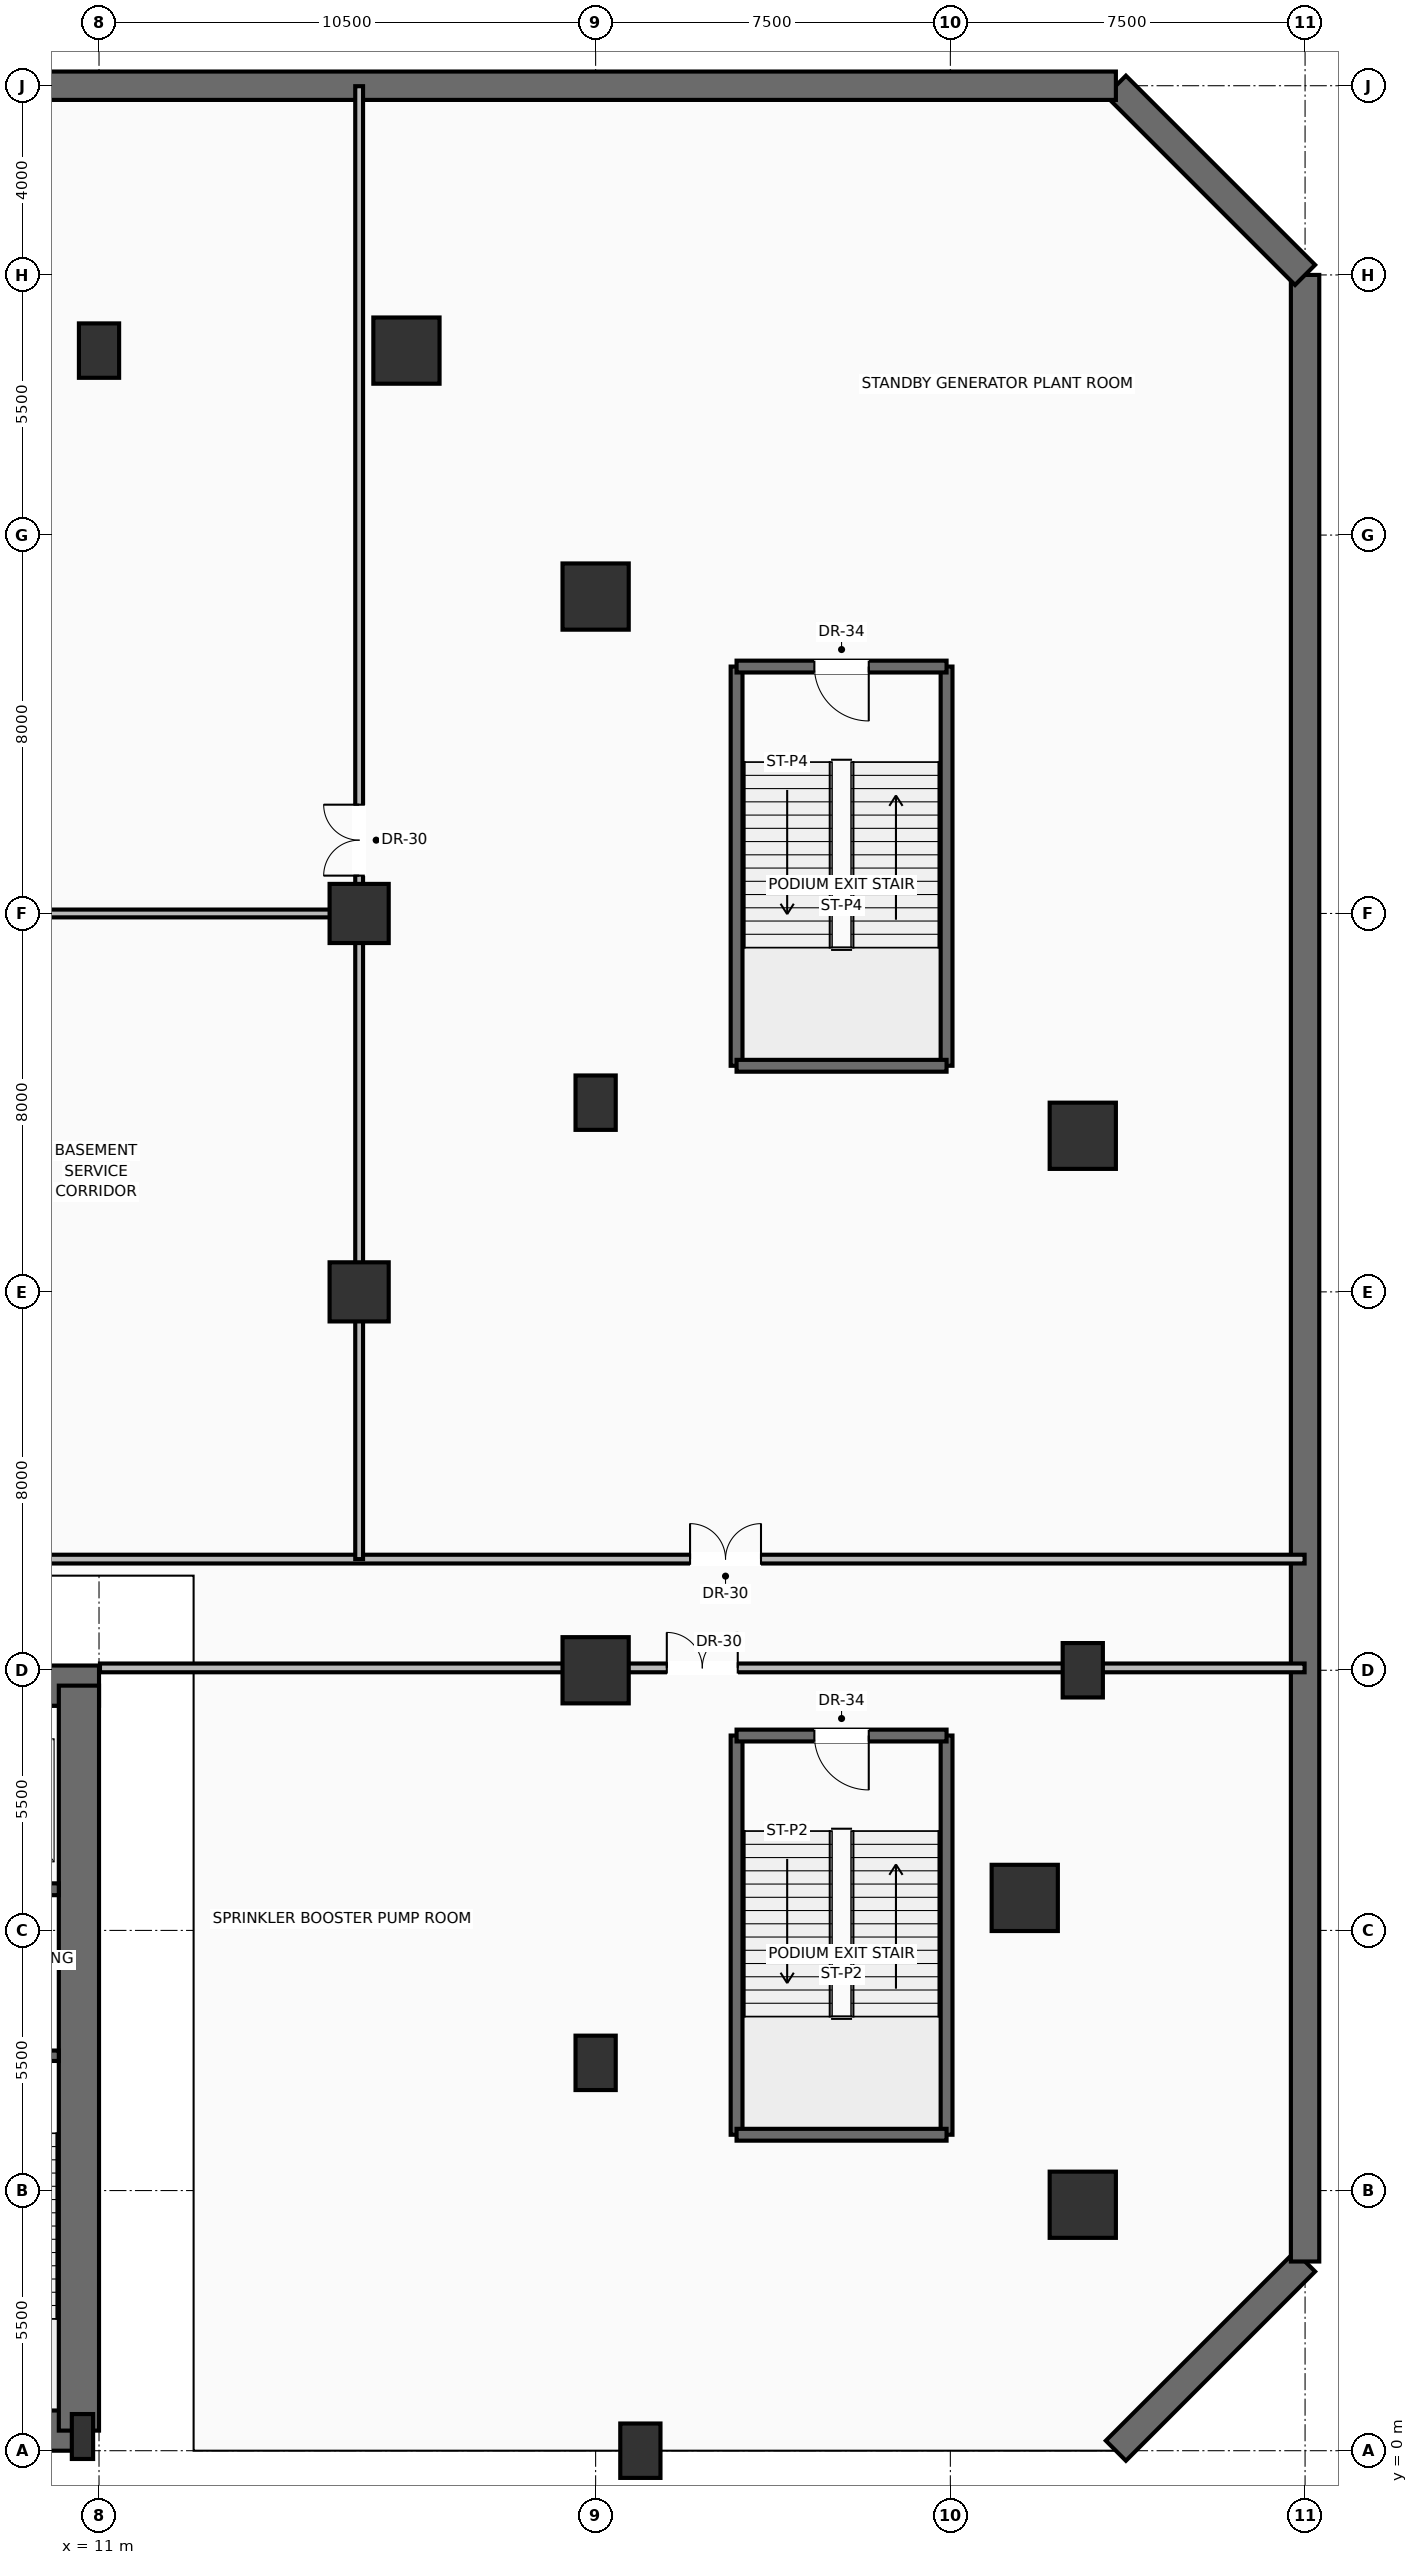
"""IFC4 building model, lengths in metres.
Left out: names, types, materials, properties, quantities, classifications, styles, units other than length and angle.
Written with IfcOpenShell. Run it as: python <this file> out.ifc"""

import sys

from ifc_helpers import new_model, si_unit, direction, frame, frame_2d, origin, origin_2d, place, context, subcontext, project, spatial, rectangle, hollow_rectangle, extrude, source, transform, mapped, element, fill, save


model = new_model("IFC4")
c1 = context("Model", 3, precision=1e-05, world=origin(), true_north=direction((0.0, 1.0)))
c2 = subcontext(c1, "Body", "Model", "MODEL_VIEW")
j1 = project(units=[si_unit("LENGTHUNIT", "METRE"), si_unit("PLANEANGLEUNIT", "RADIAN")], contexts=[c1])
p1 = place(None, origin())
s1 = spatial("IfcSite", under=j1, at=p1, CompositionType="ELEMENT")
p2 = place(p1, origin())
s2 = spatial("IfcBuilding", under=s1, at=p2, CompositionType="ELEMENT")
p3 = place(p2, frame((0.0, 0.0, -10.0)))
s3 = spatial("IfcBuildingStorey", under=s2, at=p3, CompositionType="ELEMENT", Elevation=-10.0)
p4 = place(p3, frame((32.5, 0.0, 0.0), z_axis=(0.0, 0.0, 1.0), x_axis=(0.707106781187, 0.707106781187, 0.0)))
e1 = element("IfcWall", 1, at=p4, inside=s3, PredefinedType="SOLIDWALL", context=c2, shape_type="SweptSolid", body=[
    extrude(rectangle(XDim=5.657, YDim=0.6, at=frame_2d((2.828, 0.0))), origin(), (0.0, 0.0, 1.0), 4.6),
])
p5 = place(p3, frame((36.5, 4.0, 0.0), z_axis=(0.0, 0.0, 1.0), x_axis=(0.0, 1.0, 0.0)))
e2 = element("IfcWall", 2, at=p5, inside=s3, PredefinedType="SOLIDWALL", context=c2, shape_type="SweptSolid", body=[
    extrude(rectangle(XDim=42.0, YDim=0.6, at=frame_2d((21.0, 0.0))), origin(), (0.0, 0.0, 1.0), 4.6),
])
p6 = place(p3, frame((36.5, 46.0, 0.0), z_axis=(0.0, 0.0, 1.0), x_axis=(-0.707106781187, 0.707106781187, 0.0)))
e3 = element("IfcWall", 3, at=p6, inside=s3, PredefinedType="SOLIDWALL", context=c2, shape_type="SweptSolid", body=[
    extrude(rectangle(XDim=5.657, YDim=0.6, at=frame_2d((2.828, 0.0))), origin(), (0.0, 0.0, 1.0), 4.6),
])
p7 = place(p3, frame((32.5, 50.0, 0.0), z_axis=(0.0, 0.0, 1.0), x_axis=(-1.0, 0.0, 0.0)))
e4 = element("IfcWall", 4, at=p7, inside=s3, PredefinedType="SOLIDWALL", context=c2, shape_type="SweptSolid", body=[
    extrude(rectangle(XDim=65.0, YDim=0.6, at=frame_2d((32.5, 0.0))), origin(), (0.0, 0.0, 1.0), 4.6),
])
p8 = place(p3, frame((-10.65, 0.425, 0.0), z_axis=(0.0, 0.0, 1.0), x_axis=(1.0, 0.0, 0.0)))
e5 = element("IfcWall", 5, at=p8, inside=s3, PredefinedType="SHEAR", context=c2, shape_type="SweptSolid", body=[
    extrude(rectangle(XDim=21.3, YDim=0.85, at=frame_2d((10.65, 0.0))), origin(), (0.0, 0.0, 1.0), 4.6),
])
p9 = place(p3, frame((-11.0, 16.175, 0.0), z_axis=(0.0, 0.0, 1.0), x_axis=(1.0, 0.0, 0.0)))
e6 = element("IfcWall", 6, at=p9, inside=s3, PredefinedType="SHEAR", context=c2, shape_type="SweptSolid", body=[
    extrude(rectangle(XDim=22.0, YDim=0.85, at=frame_2d((11.0, 0.0))), origin(), (0.0, 0.0, 1.0), 4.6),
])
p10 = place(p9, frame((3.57, 0.0, 0.0)))
e7 = element("IfcOpeningElement", 7, at=p10, cuts=e6, PredefinedType="OPENING", context=c2, shape_type="SweptSolid", body=[
    extrude(rectangle(XDim=1.3, YDim=2.3, at=frame_2d((0.65, 1.15))), frame((0.0, 0.435, 0.0), z_axis=(0.0, -1.0, 0.0), x_axis=(1.0, 0.0, 0.0)), (0.0, 0.0, 1.0), 0.87),
])
p11 = place(p9, frame((10.0, 0.0, 0.0)))
e8 = element("IfcOpeningElement", 8, at=p11, cuts=e6, PredefinedType="OPENING", context=c2, shape_type="SweptSolid", body=[
    extrude(rectangle(XDim=2.0, YDim=2.4, at=frame_2d((1.0, 1.2))), frame((0.0, 0.435, 0.0), z_axis=(0.0, -1.0, 0.0), x_axis=(1.0, 0.0, 0.0)), (0.0, 0.0, 1.0), 0.87),
])
p12 = place(p3, frame((10.575, 0.425, 0.0), z_axis=(0.0, 0.0, 1.0), x_axis=(0.0, 1.0, 0.0)))
e9 = element("IfcWall", 9, at=p12, inside=s3, PredefinedType="SHEAR", context=c2, shape_type="SweptSolid", body=[
    extrude(rectangle(XDim=15.75, YDim=0.85, at=frame_2d((7.875, 0.0))), origin(), (0.0, 0.0, 1.0), 4.6),
])
m1 = source(origin(), c2, "Body", "SweptSolid", [
    extrude(rectangle(XDim=0.45, YDim=0.95, at=origin_2d()), origin(), (0.0, 0.0, 1.0), 5.0),
])
p13 = place(p3, frame((10.65, 0.3, 0.0), z_axis=(0.0, 0.0, 1.0), x_axis=(1.0, 0.0, 0.0)))
e10 = element("IfcColumn", 10, at=p13, inside=s3, PredefinedType="PILASTER", context=c2, shape_type="MappedRepresentation", body=[
    mapped(m1, transform((0.0, 0.0, 0.0), scale=1.0)),
])
m2 = source(origin(), c2, "Body", "SweptSolid", [
    extrude(rectangle(XDim=0.85, YDim=1.15, at=origin_2d()), origin(), (0.0, 0.0, 1.0), 5.0),
])
for number, where, z_axis, x_axis in (
    (11, (22.446, 0.0, 0.0), (0.0, 0.0, 1.0), (1.0, 0.0, 0.0)),
    (12, (21.5, 8.2, 0.0), (0.0, 0.0, 1.0), (1.0, 0.0, 0.0)),
    (13, (31.8, 16.5, 0.0), (0.0, 0.0, 1.0), (1.0, 0.0, 0.0)),
    (14, (21.5, 28.5, 0.0), (0.0, 0.0, 1.0), (1.0, 0.0, 0.0)),
    (15, (11.0, 44.4, 0.0), (0.0, 0.0, 1.0), (1.0, 0.0, 0.0)),
):
    element("IfcColumn", number, at=place(p3, frame(where, z_axis=z_axis, x_axis=x_axis)), inside=s3, PredefinedType="COLUMN", context=c2, shape_type="MappedRepresentation", body=[
        mapped(m2, transform((0.0, 0.0, 0.0), scale=1.0)),
    ])
m3 = source(origin(), c2, "Body", "SweptSolid", [
    extrude(hollow_rectangle(XDim=1.4, YDim=1.4, WallThickness=0.07, at=origin_2d()), origin(), (0.0, 0.0, 1.0), 5.0),
])
for number, where, z_axis, x_axis in (
    (16, (21.5, 39.2, 0.0), (0.0, 0.0, 1.0), (1.0, 0.0, 0.0)),
    (17, (21.5, 16.5, 0.0), (0.0, 0.0, 1.0), (1.0, 0.0, 0.0)),
    (18, (31.8, 5.2, 0.0), (0.0, 0.0, 1.0), (1.0, 0.0, 0.0)),
    (19, (31.8, 27.8, 0.0), (0.0, 0.0, 1.0), (1.0, 0.0, 0.0)),
    (20, (17.5, 44.4, 0.0), (0.0, 0.0, 1.0), (1.0, 0.0, 0.0)),
    (21, (30.573, 11.687, 0.0), (0.0, 0.0, 1.0), (1.0, 0.0, 0.0)),
):
    element("IfcColumn", number, at=place(p3, frame(where, z_axis=z_axis, x_axis=x_axis)), inside=s3, PredefinedType="COLUMN", context=c2, shape_type="MappedRepresentation", body=[
        mapped(m3, transform((0.0, 0.0, 0.0), scale=1.0)),
    ])
m4 = source(origin(), c2, "Body", "SweptSolid", [
    extrude(rectangle(XDim=1.25, YDim=1.25, at=origin_2d()), origin(), (0.0, 0.0, 1.0), 5.0),
])
for number, where, z_axis, x_axis in (
    (22, (16.5, 24.5, 0.0), (0.0, 0.0, 1.0), (1.0, 0.0, 0.0)),
    (23, (16.5, 32.5, 0.0), (0.0, 0.0, 1.0), (1.0, 0.0, 0.0)),
):
    element("IfcColumn", number, at=place(p3, frame(where, z_axis=z_axis, x_axis=x_axis)), inside=s3, PredefinedType="COLUMN", context=c2, shape_type="MappedRepresentation", body=[
        mapped(m4, transform((0.0, 0.0, 0.0), scale=1.0)),
    ])
p14 = place(p3, frame((10.15, 8.35, 0.0), z_axis=(0.0, 0.0, 1.0), x_axis=(-1.0, 0.0, 0.0)))
e24 = element("IfcWall", 24, at=p14, inside=s3, PredefinedType="SOLIDWALL", context=c2, shape_type="SweptSolid", body=[
    extrude(rectangle(XDim=4.65, YDim=0.22, at=frame_2d((2.325, 0.0))), origin(), (0.0, 0.0, 1.0), 4.6),
])
p15 = place(p14, frame((1.0, 0.0, 0.0)))
e25 = element("IfcOpeningElement", 25, at=p15, cuts=e24, PredefinedType="OPENING", context=c2, shape_type="SweptSolid", body=[
    extrude(rectangle(XDim=1.15, YDim=2.2, at=frame_2d((0.575, 1.1))), frame((0.0, 0.12, 0.0), z_axis=(0.0, -1.0, 0.0), x_axis=(1.0, 0.0, 0.0)), (0.0, 0.0, 1.0), 0.24),
])
p16 = place(p3, frame((10.15, 11.87, 0.0), z_axis=(0.0, 0.0, 1.0), x_axis=(-1.0, 0.0, 0.0)))
e26 = element("IfcWall", 26, at=p16, inside=s3, PredefinedType="SOLIDWALL", context=c2, shape_type="SweptSolid", body=[
    extrude(rectangle(XDim=4.65, YDim=0.25, at=frame_2d((2.325, 0.0))), origin(), (0.0, 0.0, 1.0), 4.6),
])
p17 = place(p16, frame((0.5, 0.0, 0.0)))
e27 = element("IfcOpeningElement", 27, at=p17, cuts=e26, PredefinedType="OPENING", context=c2, shape_type="SweptSolid", body=[
    extrude(rectangle(XDim=1.2, YDim=2.25, at=frame_2d((0.6, 1.125))), frame((0.0, 0.135, 0.0), z_axis=(0.0, -1.0, 0.0), x_axis=(1.0, 0.0, 0.0)), (0.0, 0.0, 1.0), 0.27),
])
for number, where, z_axis, x_axis in (
    (28, (24.48, 6.68, 0.0), (0.0, 0.0, 1.0), (0.0, 1.0, 0.0)),
    (29, (28.92, 6.68, 0.0), (0.0, 0.0, 1.0), (0.0, 1.0, 0.0)),
):
    element("IfcWall", number, at=place(p3, frame(where, z_axis=z_axis, x_axis=x_axis)), inside=s3, PredefinedType="SOLIDWALL", context=c2, shape_type="SweptSolid", body=[
        extrude(rectangle(XDim=8.44, YDim=0.25, at=frame_2d((4.22, 0.0))), origin(), (0.0, 0.0, 1.0), 4.6),
    ])
p18 = place(p3, frame((24.48, 6.68, 0.0), z_axis=(0.0, 0.0, 1.0), x_axis=(1.0, 0.0, 0.0)))
e30 = element("IfcWall", 30, at=p18, inside=s3, PredefinedType="SOLIDWALL", context=c2, shape_type="SweptSolid", body=[
    extrude(rectangle(XDim=4.44, YDim=0.25, at=frame_2d((2.22, 0.0))), origin(), (0.0, 0.0, 1.0), 4.6),
])
p19 = place(p3, frame((28.92, 15.12, 0.0), z_axis=(0.0, 0.0, 1.0), x_axis=(-1.0, 0.0, 0.0)))
e31 = element("IfcWall", 31, at=p19, inside=s3, PredefinedType="SOLIDWALL", context=c2, shape_type="SweptSolid", body=[
    extrude(rectangle(XDim=4.44, YDim=0.25, at=frame_2d((2.22, 0.0))), origin(), (0.0, 0.0, 1.0), 4.6),
])
p20 = place(p19, frame((1.645, 0.0, 0.0)))
e32 = element("IfcOpeningElement", 32, at=p20, cuts=e31, PredefinedType="OPENING", context=c2, shape_type="SweptSolid", body=[
    extrude(rectangle(XDim=1.15, YDim=2.2, at=frame_2d((0.575, 1.1))), frame((0.0, 0.135, 0.0), z_axis=(0.0, -1.0, 0.0), x_axis=(1.0, 0.0, 0.0)), (0.0, 0.0, 1.0), 0.27),
])
for number, where, z_axis, x_axis in (
    (33, (24.48, 29.28, 0.0), (0.0, 0.0, 1.0), (0.0, 1.0, 0.0)),
    (34, (28.92, 29.28, 0.0), (0.0, 0.0, 1.0), (0.0, 1.0, 0.0)),
):
    element("IfcWall", number, at=place(p3, frame(where, z_axis=z_axis, x_axis=x_axis)), inside=s3, PredefinedType="SOLIDWALL", context=c2, shape_type="SweptSolid", body=[
        extrude(rectangle(XDim=8.44, YDim=0.25, at=frame_2d((4.22, 0.0))), origin(), (0.0, 0.0, 1.0), 4.6),
    ])
p21 = place(p3, frame((24.48, 29.28, 0.0), z_axis=(0.0, 0.0, 1.0), x_axis=(1.0, 0.0, 0.0)))
e35 = element("IfcWall", 35, at=p21, inside=s3, PredefinedType="SOLIDWALL", context=c2, shape_type="SweptSolid", body=[
    extrude(rectangle(XDim=4.44, YDim=0.25, at=frame_2d((2.22, 0.0))), origin(), (0.0, 0.0, 1.0), 4.6),
])
p22 = place(p3, frame((28.92, 37.72, 0.0), z_axis=(0.0, 0.0, 1.0), x_axis=(-1.0, 0.0, 0.0)))
e36 = element("IfcWall", 36, at=p22, inside=s3, PredefinedType="SOLIDWALL", context=c2, shape_type="SweptSolid", body=[
    extrude(rectangle(XDim=4.44, YDim=0.25, at=frame_2d((2.22, 0.0))), origin(), (0.0, 0.0, 1.0), 4.6),
])
p23 = place(p22, frame((1.645, 0.0, 0.0)))
e37 = element("IfcOpeningElement", 37, at=p23, cuts=e36, PredefinedType="OPENING", context=c2, shape_type="SweptSolid", body=[
    extrude(rectangle(XDim=1.15, YDim=2.2, at=frame_2d((0.575, 1.1))), frame((0.0, 0.135, 0.0), z_axis=(0.0, -1.0, 0.0), x_axis=(1.0, 0.0, 0.0)), (0.0, 0.0, 1.0), 0.27),
])
p24 = place(p3, frame((11.02, 16.55, 0.0), z_axis=(0.0, 0.0, 1.0), x_axis=(1.0, 0.0, 0.0)))
e38 = element("IfcWall", 38, at=p24, inside=s3, PredefinedType="PARTITIONING", context=c2, shape_type="SweptSolid", body=[
    extrude(rectangle(XDim=25.47, YDim=0.185, at=frame_2d((12.735, 0.0))), origin(), (0.0, 0.0, 1.0), 3.552),
])
p25 = place(p24, frame((11.985, 0.0, 0.0)))
e39 = element("IfcOpeningElement", 39, at=p25, cuts=e38, PredefinedType="OPENING", context=c2, shape_type="SweptSolid", body=[
    extrude(rectangle(XDim=1.5, YDim=2.25, at=frame_2d((0.75, 1.125))), frame((0.0, 0.103, 0.0), z_axis=(0.0, -1.0, 0.0), x_axis=(1.0, 0.0, 0.0)), (0.0, 0.0, 1.0), 0.205),
])
p26 = place(p3, frame((1.8, 18.85, 0.0), z_axis=(0.0, 0.0, 1.0), x_axis=(1.0, 0.0, 0.0)))
e40 = element("IfcWall", 40, at=p26, inside=s3, PredefinedType="PARTITIONING", context=c2, shape_type="SweptSolid", body=[
    extrude(rectangle(XDim=34.69, YDim=0.185, at=frame_2d((17.345, 0.0))), origin(), (0.0, 0.0, 1.0), 3.552),
])
p27 = place(p26, frame((21.697, 0.0, 0.0)))
e41 = element("IfcOpeningElement", 41, at=p27, cuts=e40, PredefinedType="OPENING", context=c2, shape_type="SweptSolid", body=[
    extrude(rectangle(XDim=1.5, YDim=2.25, at=frame_2d((0.75, 1.125))), frame((0.0, 0.103, 0.0), z_axis=(0.0, -1.0, 0.0), x_axis=(1.0, 0.0, 0.0)), (0.0, 0.0, 1.0), 0.205),
])
p28 = place(p3, frame((16.5, 18.85, 0.0), z_axis=(0.0, 0.0, 1.0), x_axis=(0.0, 1.0, 0.0)))
e42 = element("IfcWall", 42, at=p28, inside=s3, PredefinedType="PARTITIONING", context=c2, shape_type="SweptSolid", body=[
    extrude(rectangle(XDim=31.14, YDim=0.165, at=frame_2d((15.57, 0.0))), origin(), (0.0, 0.0, 1.0), 3.552),
])
p29 = place(p28, frame((14.45, 0.0, 0.0)))
e43 = element("IfcOpeningElement", 43, at=p29, cuts=e42, PredefinedType="OPENING", context=c2, shape_type="SweptSolid", body=[
    extrude(rectangle(XDim=1.5, YDim=2.25, at=frame_2d((0.75, 1.125))), frame((0.0, 0.093, 0.0), z_axis=(0.0, -1.0, 0.0), x_axis=(1.0, 0.0, 0.0)), (0.0, 0.0, 1.0), 0.185),
])
p30 = place(p3, frame((-16.5, 32.5, 0.0), z_axis=(0.0, 0.0, 1.0), x_axis=(1.0, 0.0, 0.0)))
e44 = element("IfcWall", 44, at=p30, inside=s3, PredefinedType="PARTITIONING", context=c2, shape_type="SweptSolid", body=[
    extrude(rectangle(XDim=33.0, YDim=0.165, at=frame_2d((16.5, 0.0))), origin(), (0.0, 0.0, 1.0), 3.552),
])
p31 = place(p30, frame((15.75, 0.0, 0.0)))
e45 = element("IfcOpeningElement", 45, at=p31, cuts=e44, PredefinedType="OPENING", context=c2, shape_type="SweptSolid", body=[
    extrude(rectangle(XDim=1.5, YDim=2.25, at=frame_2d((0.75, 1.125))), frame((0.0, 0.093, 0.0), z_axis=(0.0, -1.0, 0.0), x_axis=(1.0, 0.0, 0.0)), (0.0, 0.0, 1.0), 0.185),
])
m5 = source(origin(), c2, "Body", "SweptSolid", [
    extrude(rectangle(XDim=1.15, YDim=2.2, at=frame_2d((0.575, 1.1))), frame((0.0, 0.025, 0.0), z_axis=(0.0, -1.0, 0.0), x_axis=(1.0, 0.0, 0.0)), (0.0, 0.0, 1.0), 0.05),
])
p32 = place(p20, origin())
e46 = element("IfcDoor", 46, at=p32, inside=s3, OperationType="SINGLE_SWING_LEFT", PredefinedType="DOOR", context=c2, shape_type="MappedRepresentation", body=[
    mapped(m5, transform((0.0, 0.0, 0.0), scale=1.0)),
])
fill(e32, e46)
p33 = place(p23, origin())
e47 = element("IfcDoor", 47, at=p33, inside=s3, OperationType="SINGLE_SWING_LEFT", PredefinedType="DOOR", context=c2, shape_type="MappedRepresentation", body=[
    mapped(m5, transform((0.0, 0.0, 0.0), scale=1.0)),
])
fill(e37, e47)
m6 = source(origin(), c2, "Body", "SweptSolid", [
    extrude(rectangle(XDim=1.5, YDim=2.25, at=frame_2d((0.75, 1.125))), frame((0.0, 0.025, 0.0), z_axis=(0.0, -1.0, 0.0), x_axis=(1.0, 0.0, 0.0)), (0.0, 0.0, 1.0), 0.05),
])
p34 = place(p25, origin())
e48 = element("IfcDoor", 48, at=p34, inside=s3, OperationType="DOUBLE_DOOR_SINGLE_SWING", PredefinedType="DOOR", context=c2, shape_type="MappedRepresentation", body=[
    mapped(m6, transform((0.0, 0.0, 0.0), scale=1.0)),
])
fill(e39, e48)
p35 = place(p27, origin())
e49 = element("IfcDoor", 49, at=p35, inside=s3, OperationType="DOUBLE_DOOR_SINGLE_SWING", PredefinedType="DOOR", context=c2, shape_type="MappedRepresentation", body=[
    mapped(m6, transform((0.0, 0.0, 0.0), scale=1.0)),
])
fill(e41, e49)
p36 = place(p29, origin())
e50 = element("IfcDoor", 50, at=p36, inside=s3, OperationType="DOUBLE_DOOR_SINGLE_SWING", PredefinedType="DOOR", context=c2, shape_type="MappedRepresentation", body=[
    mapped(m6, transform((0.0, 0.0, 0.0), scale=1.0)),
])
fill(e43, e50)
save(model, sys.argv[1])
